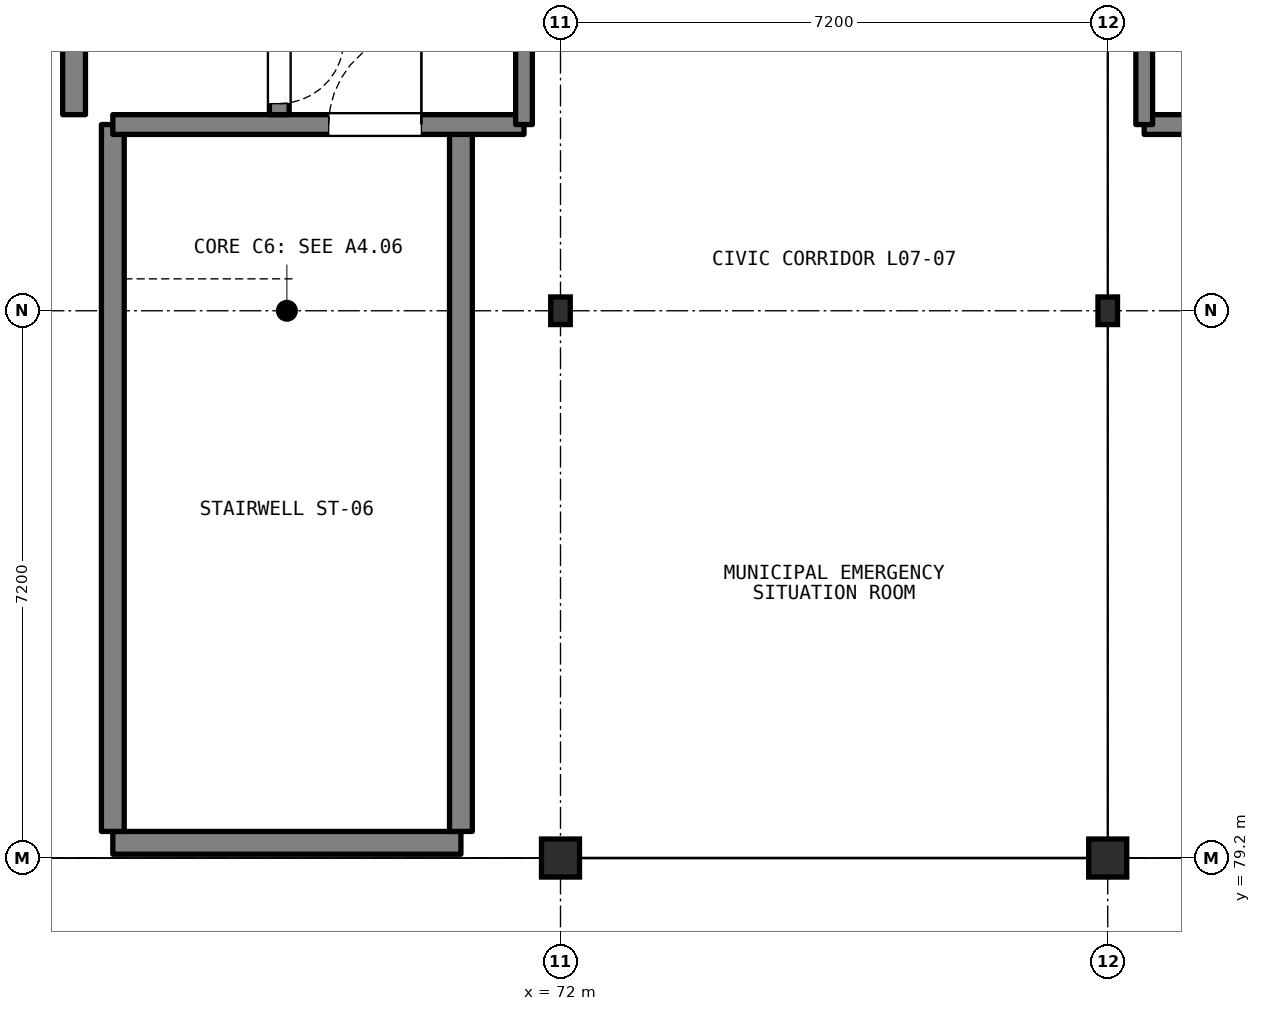
"""IFC4 building model, lengths in metres.
Left out: names, types, materials, properties, quantities, classifications, styles, units other than length and angle.
Written with IfcOpenShell. Run it as: python <this file> out.ifc"""

import sys

from ifc_helpers import new_model, si_unit, direction, frame, frame_2d, origin, origin_2d, place, context, subcontext, project, spatial, rectangle, i_section, extrude, element, fill, save


model = new_model("IFC4")
c1 = context("Model", 3, precision=1e-05, world=origin(), true_north=direction((0.0, 1.0)))
c2 = subcontext(c1, "Body", "Model", "MODEL_VIEW")
j1 = project(units=[si_unit("LENGTHUNIT", "METRE"), si_unit("PLANEANGLEUNIT", "RADIAN")], contexts=[c1])
p1 = place(None, origin())
s1 = spatial("IfcSite", under=j1, at=p1, CompositionType="ELEMENT")
p2 = place(p1, origin())
s2 = spatial("IfcBuilding", under=s1, at=p2, CompositionType="ELEMENT")
p3 = place(p2, frame((0.0, 0.0, 25.8)))
s3 = spatial("IfcBuildingStorey", under=s2, at=p3, CompositionType="ELEMENT", Elevation=25.8)
p4 = place(p3, frame((72.0, 79.2, 0.0), z_axis=(0.0, 0.0, 1.0), x_axis=(1.0, 0.0, 0.0)))
e1 = element("IfcColumn", 1, at=p4, inside=s3, PredefinedType="COLUMN", context=c2, shape_type="SweptSolid", body=[
    extrude(rectangle(XDim=0.5, YDim=0.5, at=origin_2d()), origin(), (0.0, 0.0, 1.0), 2.437),
])
p5 = place(p3, frame((72.0, 86.4, 0.0), z_axis=(0.0, 0.0, 1.0), x_axis=(1.0, 0.0, 0.0)))
e2 = element("IfcColumn", 2, at=p5, inside=s3, PredefinedType="COLUMN", context=c2, shape_type="SweptSolid", body=[
    extrude(i_section(OverallWidth=0.257, OverallDepth=0.363, WebThickness=0.013, FlangeThickness=0.022, FilletRadius=0.015, at=origin_2d()), origin(), (0.0, 0.0, 1.0), 3.733),
])
p6 = place(p3, frame((79.2, 79.2, 0.0), z_axis=(0.0, 0.0, 1.0), x_axis=(1.0, 0.0, 0.0)))
e3 = element("IfcColumn", 3, at=p6, inside=s3, PredefinedType="COLUMN", context=c2, shape_type="SweptSolid", body=[
    extrude(rectangle(XDim=0.5, YDim=0.5, at=origin_2d()), origin(), (0.0, 0.0, 1.0), 2.437),
])
p7 = place(p3, frame((79.2, 86.4, 0.0), z_axis=(0.0, 0.0, 1.0), x_axis=(1.0, 0.0, 0.0)))
e4 = element("IfcColumn", 4, at=p7, inside=s3, PredefinedType="COLUMN", context=c2, shape_type="SweptSolid", body=[
    extrude(i_section(OverallWidth=0.257, OverallDepth=0.363, WebThickness=0.013, FlangeThickness=0.022, FilletRadius=0.015, at=origin_2d()), origin(), (0.0, 0.0, 1.0), 3.733),
])
p8 = place(p3, frame((66.11, 79.4, 0.0), z_axis=(0.0, 0.0, 1.0), x_axis=(1.0, 0.0, 0.0)))
e5 = element("IfcWall", 5, at=p8, inside=s3, PredefinedType="SHEAR", context=c2, shape_type="SweptSolid", body=[
    extrude(rectangle(XDim=4.58, YDim=0.3, at=frame_2d((2.29, 0.0))), origin(), (0.0, 0.0, 1.0), 5.26),
])
for number, where, z_axis, x_axis in (
    (6, (66.11, 79.55, 0.0), (0.0, 0.0, 1.0), (0.0, 1.0, 0.0)),
    (7, (70.69, 79.55, 0.0), (0.0, 0.0, 1.0), (0.0, 1.0, 0.0)),
):
    element("IfcWall", number, at=place(p3, frame(where, z_axis=z_axis, x_axis=x_axis)), inside=s3, PredefinedType="SHEAR", context=c2, shape_type="SweptSolid", body=[
        extrude(rectangle(XDim=9.3, YDim=0.3, at=frame_2d((4.65, 0.0))), origin(), (0.0, 0.0, 1.0), 5.26),
    ])
p9 = place(p3, frame((66.11, 88.85, 0.0), z_axis=(0.0, 0.0, 1.0), x_axis=(1.0, 0.0, 0.0)))
e8 = element("IfcWall", 8, at=p9, inside=s3, PredefinedType="SHEAR", context=c2, shape_type="SweptSolid", body=[
    extrude(rectangle(XDim=5.41, YDim=0.26, at=frame_2d((2.705, 0.0))), origin(), (0.0, 0.0, 1.0), 5.26),
])
p10 = place(p9, frame((2.84, 0.0, 0.0)))
e9 = element("IfcOpeningElement", 9, at=p10, cuts=e8, PredefinedType="OPENING", context=c2, shape_type="SweptSolid", body=[
    extrude(rectangle(XDim=1.22, YDim=2.15, at=frame_2d((0.61, 1.075))), frame((0.0, 0.14, 0.0), z_axis=(0.0, -1.0, 0.0), x_axis=(1.0, 0.0, 0.0)), (0.0, 0.0, 1.0), 0.28),
])
p11 = place(p3, frame((65.6, 88.98, 0.0), z_axis=(0.0, 0.0, 1.0), x_axis=(0.0, 1.0, 0.0)))
e10 = element("IfcWall", 10, at=p11, inside=s3, PredefinedType="SHEAR", context=c2, shape_type="SweptSolid", body=[
    extrude(rectangle(XDim=4.32, YDim=0.3, at=frame_2d((2.16, 0.0))), origin(), (0.0, 0.0, 1.0), 5.26),
])
p12 = place(p3, frame((68.3, 93.3, 0.0), z_axis=(0.0, 0.0, 1.0), x_axis=(0.0, -1.0, 0.0)))
e11 = element("IfcWall", 11, at=p12, inside=s3, PredefinedType="SHEAR", context=c2, shape_type="SweptSolid", body=[
    extrude(rectangle(XDim=4.32, YDim=0.26, at=frame_2d((2.16, 0.0))), origin(), (0.0, 0.0, 1.0), 5.26),
])
p13 = place(p12, frame((1.0, 0.0, 0.0)))
e12 = element("IfcOpeningElement", 12, at=p13, cuts=e11, PredefinedType="OPENING", context=c2, shape_type="SweptSolid", body=[
    extrude(rectangle(XDim=1.2, YDim=2.15, at=frame_2d((0.6, 1.075))), frame((0.0, 0.14, 0.0), z_axis=(0.0, -1.0, 0.0), x_axis=(1.0, 0.0, 0.0)), (0.0, 0.0, 1.0), 0.28),
])
p14 = place(p12, frame((3.325, 0.0, 0.0)))
e13 = element("IfcOpeningElement", 13, at=p14, cuts=e11, PredefinedType="OPENING", context=c2, shape_type="SweptSolid", body=[
    extrude(rectangle(XDim=0.85, YDim=2.05, at=frame_2d((0.425, 1.025))), frame((0.0, 0.14, 0.0), z_axis=(0.0, -1.0, 0.0), x_axis=(1.0, 0.0, 0.0)), (0.0, 0.0, 1.0), 0.28),
])
p15 = place(p3, frame((71.52, 93.3, 0.0), z_axis=(0.0, 0.0, 1.0), x_axis=(0.0, -1.0, 0.0)))
e14 = element("IfcWall", 14, at=p15, inside=s3, PredefinedType="SHEAR", context=c2, shape_type="SweptSolid", body=[
    extrude(rectangle(XDim=4.45, YDim=0.22, at=frame_2d((2.225, 0.0))), origin(), (0.0, 0.0, 1.0), 5.26),
])
p16 = place(p15, frame((1.55, 0.0, 0.0)))
e15 = element("IfcOpeningElement", 15, at=p16, cuts=e14, PredefinedType="OPENING", context=c2, shape_type="SweptSolid", body=[
    extrude(rectangle(XDim=1.6, YDim=2.2, at=frame_2d((0.8, 1.1))), frame((0.0, 0.12, 0.0), z_axis=(0.0, -1.0, 0.0), x_axis=(1.0, 0.0, 0.0)), (0.0, 0.0, 1.0), 0.24),
])
p17 = place(p3, frame((79.68, 88.85, 0.0), z_axis=(0.0, 0.0, 1.0), x_axis=(1.0, 0.0, 0.0)))
e16 = element("IfcWall", 16, at=p17, inside=s3, PredefinedType="SHEAR", context=c2, shape_type="SweptSolid", body=[
    extrude(rectangle(XDim=5.41, YDim=0.26, at=frame_2d((2.705, 0.0))), origin(), (0.0, 0.0, 1.0), 5.26),
])
p18 = place(p17, frame((1.37, 0.0, 0.0)))
e17 = element("IfcOpeningElement", 17, at=p18, cuts=e16, PredefinedType="OPENING", context=c2, shape_type="SweptSolid", body=[
    extrude(rectangle(XDim=1.15, YDim=2.15, at=frame_2d((0.575, 1.075))), frame((0.0, 0.14, 0.0), z_axis=(0.0, -1.0, 0.0), x_axis=(1.0, 0.0, 0.0)), (0.0, 0.0, 1.0), 0.28),
])
p19 = place(p3, frame((79.68, 88.85, 0.0), z_axis=(0.0, 0.0, 1.0), x_axis=(0.0, 1.0, 0.0)))
e18 = element("IfcWall", 18, at=p19, inside=s3, PredefinedType="SHEAR", context=c2, shape_type="SweptSolid", body=[
    extrude(rectangle(XDim=4.45, YDim=0.22, at=frame_2d((2.225, 0.0))), origin(), (0.0, 0.0, 1.0), 5.26),
])
p20 = place(p19, frame((1.375, 0.0, 0.0)))
e19 = element("IfcOpeningElement", 19, at=p20, cuts=e18, PredefinedType="OPENING", context=c2, shape_type="SweptSolid", body=[
    extrude(rectangle(XDim=1.45, YDim=2.2, at=frame_2d((0.725, 1.1))), frame((0.0, 0.12, 0.0), z_axis=(0.0, -1.0, 0.0), x_axis=(1.0, 0.0, 0.0)), (0.0, 0.0, 1.0), 0.24),
])
p21 = place(p10, origin())
e20 = element("IfcDoor", 20, at=p21, inside=s3, OperationType="SINGLE_SWING_RIGHT", PredefinedType="DOOR", context=c2, shape_type="SweptSolid", body=[
    extrude(rectangle(XDim=1.22, YDim=2.15, at=frame_2d((0.61, 1.075))), frame((0.0, 0.025, 0.0), z_axis=(0.0, -1.0, 0.0), x_axis=(1.0, 0.0, 0.0)), (0.0, 0.0, 1.0), 0.05),
])
fill(e9, e20)
p22 = place(p14, origin())
e21 = element("IfcDoor", 21, at=p22, inside=s3, OperationType="SINGLE_SWING_LEFT", PredefinedType="DOOR", context=c2, shape_type="SweptSolid", body=[
    extrude(rectangle(XDim=0.85, YDim=2.05, at=frame_2d((0.425, 1.025))), frame((0.0, 0.025, 0.0), z_axis=(0.0, -1.0, 0.0), x_axis=(1.0, 0.0, 0.0)), (0.0, 0.0, 1.0), 0.05),
])
fill(e13, e21)
save(model, sys.argv[1])
